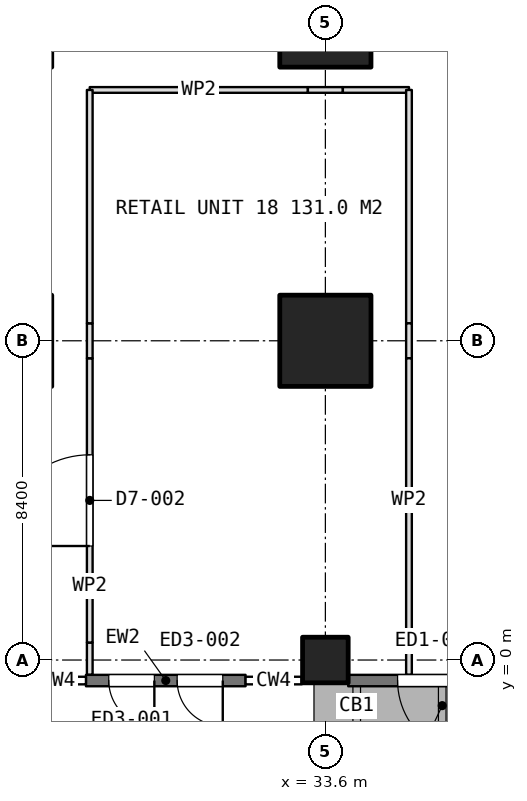
"""IFC4 building model, lengths in metres.
Left out: names, types, materials, properties, quantities, classifications, styles, units other than length and angle.
Written with IfcOpenShell. Run it as: python <this file> out.ifc"""

import sys

from ifc_helpers import new_model, si_unit, direction, frame, frame_2d, origin, origin_2d, place, context, subcontext, project, spatial, rectangle, extrude, element, fill, save


model = new_model("IFC4")
c1 = context("Model", 3, precision=1e-05, world=origin(), true_north=direction((0.0, 1.0)))
c2 = subcontext(c1, "Body", "Model", "MODEL_VIEW")
j1 = project(units=[si_unit("LENGTHUNIT", "METRE"), si_unit("PLANEANGLEUNIT", "RADIAN")], contexts=[c1])
p1 = place(None, origin())
s1 = spatial("IfcSite", under=j1, at=p1, CompositionType="ELEMENT")
p2 = place(p1, origin())
s2 = spatial("IfcBuilding", under=s1, at=p2, CompositionType="ELEMENT")
p3 = place(p2, origin())
s3 = spatial("IfcBuildingStorey", under=s2, at=p3, CompositionType="ELEMENT", Elevation=0.0)
p4 = place(p3, frame((33.6, 0.0, 0.0), z_axis=(0.0, 0.0, 1.0), x_axis=(1.0, 0.0, 0.0)))
e1 = element("IfcColumn", 1, at=p4, inside=s3, PredefinedType="COLUMN", context=c2, shape_type="SweptSolid", body=[
    extrude(rectangle(XDim=1.2, YDim=1.2, at=origin_2d()), origin(), (0.0, 0.0, 1.0), 5.4),
])
for number, where, z_axis, x_axis in (
    (2, (33.6, 8.4, 0.0), (0.0, 0.0, 1.0), (1.0, 0.0, 0.0)),
    (3, (33.6, 16.8, 0.0), (0.0, 0.0, 1.0), (1.0, 0.0, 0.0)),
):
    element("IfcColumn", number, at=place(p3, frame(where, z_axis=z_axis, x_axis=x_axis)), inside=s3, PredefinedType="COLUMN", context=c2, shape_type="SweptSolid", body=[
        extrude(rectangle(XDim=2.4, YDim=2.4, at=origin_2d()), origin(), (0.0, 0.0, 1.0), 5.4),
    ])
p5 = place(p3, frame((31.5, -0.54, 0.0), z_axis=(0.0, 0.0, 1.0), x_axis=(-1.0, 0.0, 0.0)))
e4 = element("IfcWall", 4, at=p5, inside=s3, PredefinedType="SOLIDWALL", context=c2, shape_type="SweptSolid", body=[
    extrude(rectangle(XDim=4.2, YDim=0.3, at=frame_2d((2.1, 0.0))), origin(), (0.0, 0.0, 1.0), 3.3),
])
p6 = place(p5, frame((2.4, 0.0, 0.0)))
e5 = element("IfcOpeningElement", 5, at=p6, cuts=e4, PredefinedType="OPENING", context=c2, shape_type="SweptSolid", body=[
    extrude(rectangle(XDim=1.2, YDim=2.4, at=frame_2d((0.6, 1.2))), frame((0.0, 0.16, 0.0), z_axis=(0.0, -1.0, 0.0), x_axis=(1.0, 0.0, 0.0)), (0.0, 0.0, 1.0), 0.32),
])
p7 = place(p5, frame((0.6, 0.0, 0.0)))
e6 = element("IfcOpeningElement", 6, at=p7, cuts=e4, PredefinedType="OPENING", context=c2, shape_type="SweptSolid", body=[
    extrude(rectangle(XDim=1.2, YDim=2.4, at=frame_2d((0.6, 1.2))), frame((0.0, 0.16, 0.0), z_axis=(0.0, -1.0, 0.0), x_axis=(1.0, 0.0, 0.0)), (0.0, 0.0, 1.0), 0.32),
])
p8 = place(p3, frame((41.399, -0.54, 0.0), z_axis=(0.0, 0.0, 1.0), x_axis=(-1.0, 0.0, 0.0)))
e7 = element("IfcWall", 7, at=p8, inside=s3, PredefinedType="SOLIDWALL", context=c2, shape_type="SweptSolid", body=[
    extrude(rectangle(XDim=7.198, YDim=0.3, at=frame_2d((3.599, 0.0))), origin(), (0.0, 0.0, 1.0), 3.3),
])
p9 = place(p8, frame((3.899, 0.0, 0.0)))
e8 = element("IfcOpeningElement", 8, at=p9, cuts=e7, PredefinedType="OPENING", context=c2, shape_type="SweptSolid", body=[
    extrude(rectangle(XDim=2.0, YDim=2.7, at=frame_2d((1.0, 1.35))), frame((0.0, 0.16, 0.0), z_axis=(0.0, -1.0, 0.0), x_axis=(1.0, 0.0, 0.0)), (0.0, 0.0, 1.0), 0.32),
])
p10 = place(p8, frame((1.299, 0.0, 0.0)))
e9 = element("IfcOpeningElement", 9, at=p10, cuts=e7, PredefinedType="OPENING", context=c2, shape_type="SweptSolid", body=[
    extrude(rectangle(XDim=2.0, YDim=2.7, at=frame_2d((1.0, 1.35))), frame((0.0, 0.16, 0.0), z_axis=(0.0, -1.0, 0.0), x_axis=(1.0, 0.0, 0.0)), (0.0, 0.0, 1.0), 0.32),
])
p11 = place(p3, frame((27.4, 15.0, 0.0), z_axis=(0.0, 0.0, 1.0), x_axis=(1.0, 0.0, 0.0)))
e10 = element("IfcWall", 10, at=p11, inside=s3, PredefinedType="PARTITIONING", context=c2, shape_type="SweptSolid", body=[
    extrude(rectangle(XDim=5.74, YDim=0.15, at=frame_2d((2.87, 0.0))), origin(), (0.0, 0.0, 1.0), 5.1),
])
p12 = place(p3, frame((33.14, 15.0, 0.0), z_axis=(0.0, 0.0, 1.0), x_axis=(1.0, 0.0, 0.0)))
e11 = element("IfcWall", 11, at=p12, inside=s3, PredefinedType="PARTITIONING", context=c2, shape_type="SweptSolid", body=[
    extrude(rectangle(XDim=0.92, YDim=0.15, at=frame_2d((0.46, 0.0))), origin(), (0.0, 0.0, 1.0), 3.3),
])
p13 = place(p3, frame((34.06, 15.0, 0.0), z_axis=(0.0, 0.0, 1.0), x_axis=(1.0, 0.0, 0.0)))
e12 = element("IfcWall", 12, at=p13, inside=s3, PredefinedType="PARTITIONING", context=c2, shape_type="SweptSolid", body=[
    extrude(rectangle(XDim=1.74, YDim=0.15, at=frame_2d((0.87, 0.0))), origin(), (0.0, 0.0, 1.0), 5.1),
])
p14 = place(p3, frame((35.8, 15.0, 0.0), z_axis=(0.0, 0.0, 1.0), x_axis=(0.0, -1.0, 0.0)))
e13 = element("IfcWall", 13, at=p14, inside=s3, PredefinedType="PARTITIONING", context=c2, shape_type="SweptSolid", body=[
    extrude(rectangle(XDim=6.14, YDim=0.15, at=frame_2d((3.07, 0.0))), origin(), (0.0, 0.0, 1.0), 5.1),
])
p15 = place(p3, frame((35.8, 8.86, 0.0), z_axis=(0.0, 0.0, 1.0), x_axis=(0.0, -1.0, 0.0)))
e14 = element("IfcWall", 14, at=p15, inside=s3, PredefinedType="PARTITIONING", context=c2, shape_type="SweptSolid", body=[
    extrude(rectangle(XDim=0.92, YDim=0.15, at=frame_2d((0.46, 0.0))), origin(), (0.0, 0.0, 1.0), 3.3),
])
p16 = place(p3, frame((35.8, 7.94, 0.0), z_axis=(0.0, 0.0, 1.0), x_axis=(0.0, -1.0, 0.0)))
e15 = element("IfcWall", 15, at=p16, inside=s3, PredefinedType="PARTITIONING", context=c2, shape_type="SweptSolid", body=[
    extrude(rectangle(XDim=7.48, YDim=0.15, at=frame_2d((3.74, 0.0))), origin(), (0.0, 0.0, 1.0), 5.1),
])
for number, where, z_axis, x_axis in (
    (16, (35.8, 0.46, 0.0), (0.0, 0.0, 1.0), (0.0, -1.0, 0.0)),
    (17, (27.4, -0.39, 0.0), (0.0, 0.0, 1.0), (0.0, 1.0, 0.0)),
):
    element("IfcWall", number, at=place(p3, frame(where, z_axis=z_axis, x_axis=x_axis)), inside=s3, PredefinedType="PARTITIONING", context=c2, shape_type="SweptSolid", body=[
        extrude(rectangle(XDim=0.85, YDim=0.15, at=frame_2d((0.425, 0.0))), origin(), (0.0, 0.0, 1.0), 3.3),
    ])
p17 = place(p3, frame((27.4, 0.46, 0.0), z_axis=(0.0, 0.0, 1.0), x_axis=(0.0, 1.0, 0.0)))
e18 = element("IfcWall", 18, at=p17, inside=s3, PredefinedType="PARTITIONING", context=c2, shape_type="SweptSolid", body=[
    extrude(rectangle(XDim=7.48, YDim=0.15, at=frame_2d((3.74, 0.0))), origin(), (0.0, 0.0, 1.0), 5.1),
])
p18 = place(p17, frame((2.54, 0.0, 0.0)))
e19 = element("IfcOpeningElement", 19, at=p18, cuts=e18, PredefinedType="OPENING", context=c2, shape_type="SweptSolid", body=[
    extrude(rectangle(XDim=2.4, YDim=2.4, at=frame_2d((1.2, 1.2))), frame((0.0, 0.085, 0.0), z_axis=(0.0, -1.0, 0.0), x_axis=(1.0, 0.0, 0.0)), (0.0, 0.0, 1.0), 0.17),
])
p19 = place(p3, frame((27.4, 7.94, 0.0), z_axis=(0.0, 0.0, 1.0), x_axis=(0.0, 1.0, 0.0)))
e20 = element("IfcWall", 20, at=p19, inside=s3, PredefinedType="PARTITIONING", context=c2, shape_type="SweptSolid", body=[
    extrude(rectangle(XDim=0.92, YDim=0.15, at=frame_2d((0.46, 0.0))), origin(), (0.0, 0.0, 1.0), 3.3),
])
p20 = place(p3, frame((27.4, 8.86, 0.0), z_axis=(0.0, 0.0, 1.0), x_axis=(0.0, 1.0, 0.0)))
e21 = element("IfcWall", 21, at=p20, inside=s3, PredefinedType="PARTITIONING", context=c2, shape_type="SweptSolid", body=[
    extrude(rectangle(XDim=6.14, YDim=0.15, at=frame_2d((3.07, 0.0))), origin(), (0.0, 0.0, 1.0), 5.1),
])
p21 = place(p6, origin())
e22 = element("IfcDoor", 22, at=p21, inside=s3, OperationType="SINGLE_SWING_LEFT", PredefinedType="DOOR", context=c2, shape_type="SweptSolid", body=[
    extrude(rectangle(XDim=1.2, YDim=2.4, at=frame_2d((0.6, 1.2))), frame((0.0, 0.025, 0.0), z_axis=(0.0, -1.0, 0.0), x_axis=(1.0, 0.0, 0.0)), (0.0, 0.0, 1.0), 0.05),
])
fill(e5, e22)
p22 = place(p7, origin())
e23 = element("IfcDoor", 23, at=p22, inside=s3, OperationType="SINGLE_SWING_LEFT", PredefinedType="DOOR", context=c2, shape_type="SweptSolid", body=[
    extrude(rectangle(XDim=1.2, YDim=2.4, at=frame_2d((0.6, 1.2))), frame((0.0, 0.025, 0.0), z_axis=(0.0, -1.0, 0.0), x_axis=(1.0, 0.0, 0.0)), (0.0, 0.0, 1.0), 0.05),
])
fill(e6, e23)
p23 = place(p9, origin())
e24 = element("IfcDoor", 24, at=p23, inside=s3, OperationType="DOUBLE_DOOR_SINGLE_SWING", PredefinedType="DOOR", context=c2, shape_type="SweptSolid", body=[
    extrude(rectangle(XDim=2.0, YDim=2.7, at=frame_2d((1.0, 1.35))), frame((0.0, 0.025, 0.0), z_axis=(0.0, -1.0, 0.0), x_axis=(1.0, 0.0, 0.0)), (0.0, 0.0, 1.0), 0.05),
])
fill(e8, e24)
p24 = place(p18, origin())
e25 = element("IfcDoor", 25, at=p24, inside=s3, OperationType="DOUBLE_DOOR_SINGLE_SWING", PredefinedType="DOOR", context=c2, shape_type="SweptSolid", body=[
    extrude(rectangle(XDim=2.4, YDim=2.4, at=frame_2d((1.2, 1.2))), frame((0.0, 0.025, 0.0), z_axis=(0.0, -1.0, 0.0), x_axis=(1.0, 0.0, 0.0)), (0.0, 0.0, 1.0), 0.05),
])
fill(e19, e25)
save(model, sys.argv[1])
